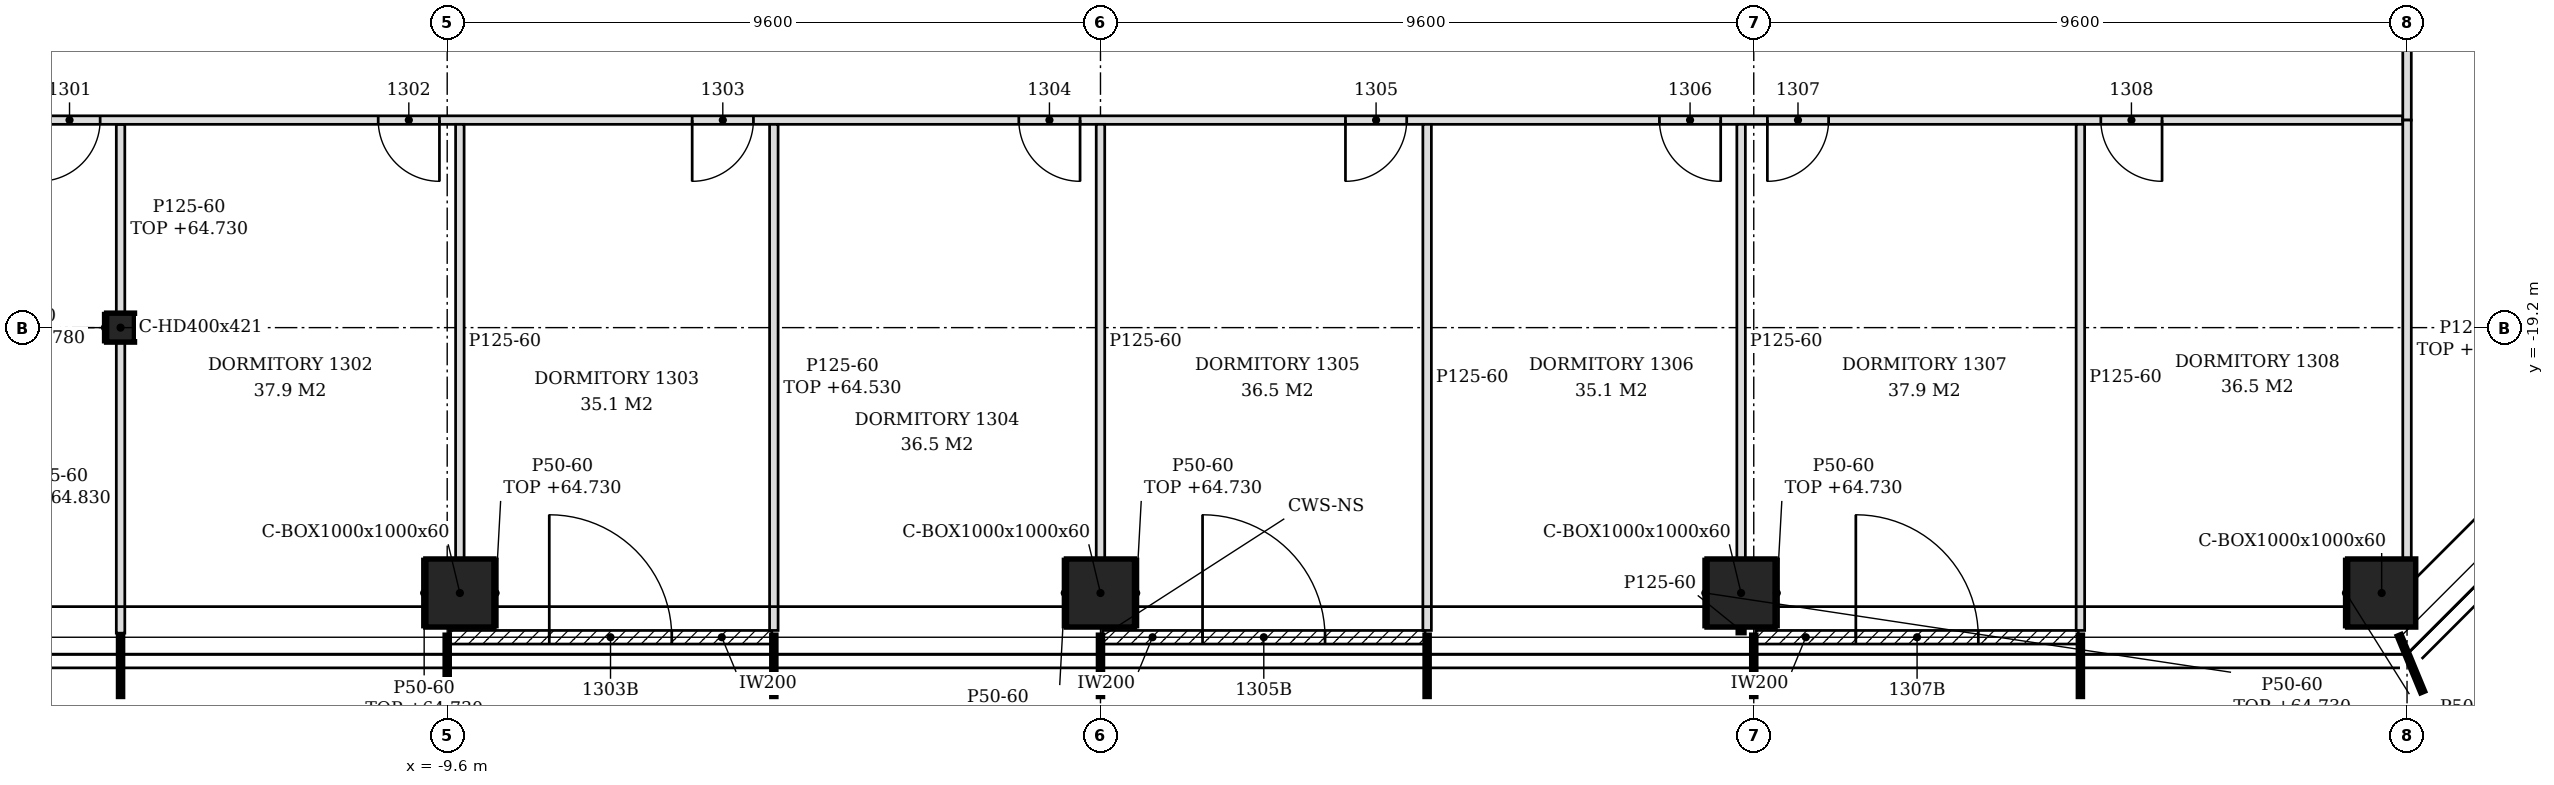
"""IFC4 building model, lengths in metres.
Left out: names, types, materials, properties, quantities, classifications, styles, units other than length and angle.
Written with IfcOpenShell. Run it as: python <this file> out.ifc"""

import sys

from ifc_helpers import new_model, si_unit, direction, frame, frame_2d, origin, origin_2d, place, context, subcontext, project, spatial, polyline, rectangle, hollow_rectangle, i_section, outline, extrude, element, fill, save


model = new_model("IFC4")
c1 = context("Model", 3, precision=1e-05, world=origin(), true_north=direction((0.0, 1.0)))
c2 = subcontext(c1, "Body", "Model", "MODEL_VIEW")
j1 = project(units=[si_unit("LENGTHUNIT", "METRE"), si_unit("PLANEANGLEUNIT", "RADIAN")], contexts=[c1])
p1 = place(None, origin())
s1 = spatial("IfcSite", under=j1, at=p1, CompositionType="ELEMENT")
p2 = place(p1, origin())
s2 = spatial("IfcBuilding", under=s1, at=p2, CompositionType="ELEMENT")
p3 = place(p2, frame((0.0, 0.0, 61.8)))
s3 = spatial("IfcBuildingStorey", under=s2, at=p3, CompositionType="ELEMENT", Elevation=61.8)
for number, where, z_axis, x_axis in (
    (1, (-9.414, -23.1, -0.15), (0.0, 0.0, 1.0), (1.0, 0.0, 0.0)),
    (2, (0.0, -23.1, -0.15), (0.0, 0.0, 1.0), (1.0, 0.0, 0.0)),
    (3, (9.414, -23.1, -0.15), (0.0, 0.0, 1.0), (1.0, 0.0, 0.0)),
    (4, (18.827, -23.1, -0.15), (0.0, 0.0, 1.0), (1.0, 0.0, 0.0)),
):
    element("IfcColumn", number, at=place(p3, frame(where, z_axis=z_axis, x_axis=x_axis)), inside=s3, PredefinedType="COLUMN", context=c2, shape_type="SweptSolid", body=[
        extrude(hollow_rectangle(XDim=1.0, YDim=1.0, WallThickness=0.06, at=origin_2d()), origin(), (0.0, 0.0, 1.0), 3.6),
    ])
p4 = place(p3, frame((-14.4, -19.2, -0.15), z_axis=(0.0, 0.0, 1.0), x_axis=(1.0, 0.0, 0.0)))
e5 = element("IfcColumn", 5, at=p4, inside=s3, PredefinedType="COLUMN", context=c2, shape_type="SweptSolid", body=[
    extrude(i_section(OverallWidth=0.409, OverallDepth=0.425, WebThickness=0.033, FlangeThickness=0.052, FilletRadius=0.015, at=origin_2d()), origin(), (0.0, 0.0, 1.0), 3.6),
])
p5 = place(p3, frame((-9.57, -23.75, 0.0), z_axis=(0.0, 0.0, 1.0), x_axis=(1.0, 0.0, 0.0)))
e6 = element("IfcWall", 6, at=p5, inside=s3, PredefinedType="NOTDEFINED", context=c2, shape_type="SweptSolid", body=[
    extrude(rectangle(XDim=4.74, YDim=0.2, at=frame_2d((2.37, 0.0))), origin(), (0.0, 0.0, 1.0), 3.45),
])
p6 = place(p5, frame((1.47, 0.0, 0.0)))
e7 = element("IfcOpeningElement", 7, at=p6, cuts=e6, PredefinedType="OPENING", context=c2, shape_type="SweptSolid", body=[
    extrude(rectangle(XDim=1.8, YDim=2.4, at=frame_2d((0.9, 1.2))), frame((0.0, 0.11, 0.0), z_axis=(0.0, -1.0, 0.0), x_axis=(1.0, 0.0, 0.0)), (0.0, 0.0, 1.0), 0.22),
])
p7 = place(p3, frame((0.03, -23.75, 0.0), z_axis=(0.0, 0.0, 1.0), x_axis=(1.0, 0.0, 0.0)))
e8 = element("IfcWall", 8, at=p7, inside=s3, PredefinedType="NOTDEFINED", context=c2, shape_type="SweptSolid", body=[
    extrude(rectangle(XDim=4.74, YDim=0.2, at=frame_2d((2.37, 0.0))), origin(), (0.0, 0.0, 1.0), 3.45),
])
p8 = place(p7, frame((1.47, 0.0, 0.0)))
e9 = element("IfcOpeningElement", 9, at=p8, cuts=e8, PredefinedType="OPENING", context=c2, shape_type="SweptSolid", body=[
    extrude(rectangle(XDim=1.8, YDim=2.4, at=frame_2d((0.9, 1.2))), frame((0.0, 0.11, 0.0), z_axis=(0.0, -1.0, 0.0), x_axis=(1.0, 0.0, 0.0)), (0.0, 0.0, 1.0), 0.22),
])
p9 = place(p3, frame((9.63, -23.75, 0.0), z_axis=(0.0, 0.0, 1.0), x_axis=(1.0, 0.0, 0.0)))
e10 = element("IfcWall", 10, at=p9, inside=s3, PredefinedType="NOTDEFINED", context=c2, shape_type="SweptSolid", body=[
    extrude(rectangle(XDim=4.74, YDim=0.2, at=frame_2d((2.37, 0.0))), origin(), (0.0, 0.0, 1.0), 3.45),
])
p10 = place(p9, frame((1.47, 0.0, 0.0)))
e11 = element("IfcOpeningElement", 11, at=p10, cuts=e10, PredefinedType="OPENING", context=c2, shape_type="SweptSolid", body=[
    extrude(rectangle(XDim=1.8, YDim=2.4, at=frame_2d((0.9, 1.2))), frame((0.0, 0.11, 0.0), z_axis=(0.0, -1.0, 0.0), x_axis=(1.0, 0.0, 0.0)), (0.0, 0.0, 1.0), 0.22),
])
p11 = place(p3, frame((-14.4, -23.69, 0.0), z_axis=(0.0, 0.0, 1.0), x_axis=(0.0, 1.0, 0.0)))
e12 = element("IfcWall", 12, at=p11, inside=s3, PredefinedType="PARTITIONING", context=c2, shape_type="SweptSolid", body=[
    extrude(outline(polyline([(0.0, 0.0), (4.277, 0.0), (4.278, 3.03), (0.74, 3.03), (0.738, 2.93), (0.44, 2.93), (0.438, 3.03), (0.0, 3.03), (0.0, 0.0)])), frame((0.0, 0.062, 0.0), z_axis=(0.0, -1.0, 0.0), x_axis=(1.0, 0.0, 0.0)), (0.0, 0.0, 1.0), 0.125),
])
p12 = place(p3, frame((-4.8, -23.65, 0.0), z_axis=(0.0, 0.0, 1.0), x_axis=(0.0, 1.0, 0.0)))
e13 = element("IfcWall", 13, at=p12, inside=s3, PredefinedType="PARTITIONING", context=c2, shape_type="SweptSolid", body=[
    extrude(rectangle(XDim=7.438, YDim=0.125, at=frame_2d((3.719, 0.0))), origin(), (0.0, 0.0, 1.0), 2.73),
])
p13 = place(p3, frame((4.8, -23.65, 0.0), z_axis=(0.0, 0.0, 1.0), x_axis=(0.0, 1.0, 0.0)))
e14 = element("IfcWall", 14, at=p13, inside=s3, PredefinedType="PARTITIONING", context=c2, shape_type="SweptSolid", body=[
    extrude(outline(polyline([(0.0, 0.0), (7.438, 0.0), (7.438, 3.45), (4.555, 3.45), (4.553, 2.88), (4.345, 2.88), (4.343, 3.45), (0.7, 3.45), (0.698, 2.93), (0.4, 2.93), (0.398, 3.45), (0.0, 3.45), (0.0, 0.0)])), frame((0.0, 0.062, 0.0), z_axis=(0.0, -1.0, 0.0), x_axis=(1.0, 0.0, 0.0)), (0.0, 0.0, 1.0), 0.125),
])
p14 = place(p3, frame((9.414, -23.703, 0.0), z_axis=(0.0, 0.0, 1.0), x_axis=(0.0, 1.0, 0.0)))
e15 = element("IfcWall", 15, at=p14, inside=s3, PredefinedType="PARTITIONING", context=c2, shape_type="SweptSolid", body=[
    extrude(rectangle(XDim=0.103, YDim=0.125, at=frame_2d((0.051, 0.0))), origin(), (0.0, 0.0, 1.0), 3.45),
])
p15 = place(p3, frame((14.4, -23.65, 0.0), z_axis=(0.0, 0.0, 1.0), x_axis=(0.0, 1.0, 0.0)))
e16 = element("IfcWall", 16, at=p15, inside=s3, PredefinedType="PARTITIONING", context=c2, shape_type="SweptSolid", body=[
    extrude(outline(polyline([(0.0, 0.0), (7.438, 0.0), (7.438, 3.45), (4.555, 3.45), (4.553, 2.88), (4.345, 2.88), (4.343, 3.45), (0.7, 3.45), (0.698, 2.93), (0.4, 2.93), (0.398, 3.45), (0.0, 3.45), (0.0, 0.0)])), frame((0.0, 0.062, 0.0), z_axis=(0.0, -1.0, 0.0), x_axis=(1.0, 0.0, 0.0)), (0.0, 0.0, 1.0), 0.125),
])
p16 = place(p3, frame((-9.414, -22.6, 0.0), z_axis=(0.0, 0.0, 1.0), x_axis=(0.0, 1.0, 0.0)))
e17 = element("IfcWall", 17, at=p16, inside=s3, PredefinedType="PARTITIONING", context=c2, shape_type="SweptSolid", body=[
    extrude(outline(polyline([(0.0, 0.0), (6.388, 0.0), (6.387, 3.45), (3.5, 3.45), (3.498, 2.93), (3.3, 2.93), (3.298, 3.45), (0.0, 3.45), (0.0, 0.0)])), frame((0.0, 0.062, 0.0), z_axis=(0.0, -1.0, 0.0), x_axis=(1.0, 0.0, 0.0)), (0.0, 0.0, 1.0), 0.125),
])
for number, where, z_axis, x_axis in (
    (18, (0.0, -22.6, 0.0), (0.0, 0.0, 1.0), (0.0, 1.0, 0.0)),
    (19, (9.414, -22.6, 0.0), (0.0, 0.0, 1.0), (0.0, 1.0, 0.0)),
):
    element("IfcWall", number, at=place(p3, frame(where, z_axis=z_axis, x_axis=x_axis)), inside=s3, PredefinedType="PARTITIONING", context=c2, shape_type="SweptSolid", body=[
        extrude(outline(polyline([(0.0, 0.0), (6.388, 0.0), (6.387, 3.45), (3.505, 3.45), (3.503, 2.88), (3.295, 2.88), (3.293, 3.45), (0.0, 3.45), (0.0, 0.0)])), frame((0.0, 0.062, 0.0), z_axis=(0.0, -1.0, 0.0), x_axis=(1.0, 0.0, 0.0)), (0.0, 0.0, 1.0), 0.125),
    ])
p17 = place(p3, frame((19.2, -22.6, 0.0), z_axis=(0.0, 0.0, 1.0), x_axis=(0.0, 1.0, 0.0)))
e20 = element("IfcWall", 20, at=p17, inside=s3, PredefinedType="PARTITIONING", context=c2, shape_type="SweptSolid", body=[
    extrude(outline(polyline([(0.0, 0.0), (6.45, 0.0), (6.45, 2.73), (0.43, 2.73), (0.428, 2.63), (0.0, 2.63), (0.0, 0.0)])), frame((0.0, 0.062, 0.0), z_axis=(0.0, -1.0, 0.0), x_axis=(1.0, 0.0, 0.0)), (0.0, 0.0, 1.0), 0.125),
])
p18 = place(p3, frame((-14.4, -18.988, 0.0), z_axis=(0.0, 0.0, 1.0), x_axis=(0.0, 1.0, 0.0)))
e21 = element("IfcWall", 21, at=p18, inside=s3, PredefinedType="PARTITIONING", context=c2, shape_type="SweptSolid", body=[
    extrude(rectangle(XDim=2.775, YDim=0.125, at=frame_2d((1.388, 0.0))), origin(), (0.0, 0.0, 1.0), 2.93),
])
p19 = place(p3, frame((-22.55, -16.15, 0.0), z_axis=(0.0, 0.0, 1.0), x_axis=(1.0, 0.0, 0.0)))
e22 = element("IfcWall", 22, at=p19, inside=s3, PredefinedType="PARTITIONING", context=c2, shape_type="SweptSolid", body=[
    extrude(outline(polyline([(0.0, 0.0), (41.688, 0.0), (41.688, 2.73), (41.6, 2.73), (41.598, 3.45), (29.9, 3.45), (29.898, 2.73), (29.6, 2.73), (29.598, 3.45), (17.9, 3.45), (17.898, 2.73), (17.6, 2.73), (17.598, 3.45), (8.3, 3.45), (8.298, 2.93), (8.0, 2.93), (7.998, 3.45), (0.0, 3.45), (0.0, 0.0)])), frame((0.0, 0.062, 0.0), z_axis=(0.0, -1.0, 0.0), x_axis=(1.0, 0.0, 0.0)), (0.0, 0.0, 1.0), 0.125),
])
p20 = place(p19, frame((6.95, 0.0, 0.0)))
e23 = element("IfcOpeningElement", 23, at=p20, cuts=e22, PredefinedType="OPENING", context=c2, shape_type="SweptSolid", body=[
    extrude(rectangle(XDim=0.9, YDim=2.1, at=frame_2d((0.45, 1.05))), frame((0.0, 0.073, 0.0), z_axis=(0.0, -1.0, 0.0), x_axis=(1.0, 0.0, 0.0)), (0.0, 0.0, 1.0), 0.145),
])
p21 = place(p19, frame((11.936, 0.0, 0.0)))
e24 = element("IfcOpeningElement", 24, at=p21, cuts=e22, PredefinedType="OPENING", context=c2, shape_type="SweptSolid", body=[
    extrude(rectangle(XDim=0.9, YDim=2.1, at=frame_2d((0.45, 1.05))), frame((0.0, 0.073, 0.0), z_axis=(0.0, -1.0, 0.0), x_axis=(1.0, 0.0, 0.0)), (0.0, 0.0, 1.0), 0.145),
])
p22 = place(p19, frame((16.55, 0.0, 0.0)))
e25 = element("IfcOpeningElement", 25, at=p22, cuts=e22, PredefinedType="OPENING", context=c2, shape_type="SweptSolid", body=[
    extrude(rectangle(XDim=0.9, YDim=2.1, at=frame_2d((0.45, 1.05))), frame((0.0, 0.073, 0.0), z_axis=(0.0, -1.0, 0.0), x_axis=(1.0, 0.0, 0.0)), (0.0, 0.0, 1.0), 0.145),
])
p23 = place(p19, frame((21.35, 0.0, 0.0)))
e26 = element("IfcOpeningElement", 26, at=p23, cuts=e22, PredefinedType="OPENING", context=c2, shape_type="SweptSolid", body=[
    extrude(rectangle(XDim=0.9, YDim=2.1, at=frame_2d((0.45, 1.05))), frame((0.0, 0.073, 0.0), z_axis=(0.0, -1.0, 0.0), x_axis=(1.0, 0.0, 0.0)), (0.0, 0.0, 1.0), 0.145),
])
p24 = place(p19, frame((26.15, 0.0, 0.0)))
e27 = element("IfcOpeningElement", 27, at=p24, cuts=e22, PredefinedType="OPENING", context=c2, shape_type="SweptSolid", body=[
    extrude(rectangle(XDim=0.9, YDim=2.1, at=frame_2d((0.45, 1.05))), frame((0.0, 0.073, 0.0), z_axis=(0.0, -1.0, 0.0), x_axis=(1.0, 0.0, 0.0)), (0.0, 0.0, 1.0), 0.145),
])
p25 = place(p19, frame((30.764, 0.0, 0.0)))
e28 = element("IfcOpeningElement", 28, at=p25, cuts=e22, PredefinedType="OPENING", context=c2, shape_type="SweptSolid", body=[
    extrude(rectangle(XDim=0.9, YDim=2.1, at=frame_2d((0.45, 1.05))), frame((0.0, 0.073, 0.0), z_axis=(0.0, -1.0, 0.0), x_axis=(1.0, 0.0, 0.0)), (0.0, 0.0, 1.0), 0.145),
])
p26 = place(p19, frame((32.35, 0.0, 0.0)))
e29 = element("IfcOpeningElement", 29, at=p26, cuts=e22, PredefinedType="OPENING", context=c2, shape_type="SweptSolid", body=[
    extrude(rectangle(XDim=0.9, YDim=2.1, at=frame_2d((0.45, 1.05))), frame((0.0, 0.073, 0.0), z_axis=(0.0, -1.0, 0.0), x_axis=(1.0, 0.0, 0.0)), (0.0, 0.0, 1.0), 0.145),
])
p27 = place(p19, frame((37.25, 0.0, 0.0)))
e30 = element("IfcOpeningElement", 30, at=p27, cuts=e22, PredefinedType="OPENING", context=c2, shape_type="SweptSolid", body=[
    extrude(rectangle(XDim=0.9, YDim=2.1, at=frame_2d((0.45, 1.05))), frame((0.0, 0.073, 0.0), z_axis=(0.0, -1.0, 0.0), x_axis=(1.0, 0.0, 0.0)), (0.0, 0.0, 1.0), 0.145),
])
p28 = place(p3, frame((19.2, -16.15, 0.0), z_axis=(0.0, 0.0, 1.0), x_axis=(0.0, 1.0, 0.0)))
e31 = element("IfcWall", 31, at=p28, inside=s3, PredefinedType="PARTITIONING", context=c2, shape_type="SweptSolid", body=[
    extrude(rectangle(XDim=7.513, YDim=0.125, at=frame_2d((3.756, 0.0))), origin(), (0.0, 0.0, 1.0), 2.73),
])
p29 = place(p28, frame((5.35, 0.0, 0.0)))
e32 = element("IfcOpeningElement", 32, at=p29, cuts=e31, PredefinedType="OPENING", context=c2, shape_type="SweptSolid", body=[
    extrude(rectangle(XDim=0.9, YDim=2.1, at=frame_2d((0.45, 1.05))), frame((0.0, 0.073, 0.0), z_axis=(0.0, -1.0, 0.0), x_axis=(1.0, 0.0, 0.0)), (0.0, 0.0, 1.0), 0.145),
])
p30 = place(p3, frame((-14.629, -19.413, 0.0), z_axis=(0.0, 0.0, 1.0), x_axis=(0.0, 1.0, 0.0)))
e33 = element("IfcWall", 33, at=p30, inside=s3, PredefinedType="PARTITIONING", context=c2, shape_type="SweptSolid", body=[
    extrude(rectangle(XDim=0.425, YDim=0.05, at=frame_2d((0.212, 0.0))), origin(), (0.0, 0.0, 1.0), 2.98),
])
for number, where, z_axis, x_axis in (
    (34, (-0.525, -23.6, 0.0), (0.0, 0.0, 1.0), (0.0, 1.0, 0.0)),
    (35, (0.525, -23.6, 0.0), (0.0, 0.0, 1.0), (0.0, 1.0, 0.0)),
    (36, (8.889, -23.6, 0.0), (0.0, 0.0, 1.0), (0.0, 1.0, 0.0)),
    (37, (9.939, -23.6, 0.0), (0.0, 0.0, 1.0), (0.0, 1.0, 0.0)),
    (38, (-9.939, -23.6, 0.0), (0.0, 0.0, 1.0), (0.0, 1.0, 0.0)),
    (39, (-8.889, -23.6, 0.0), (0.0, 0.0, 1.0), (0.0, 1.0, 0.0)),
    (40, (18.302, -23.6, 0.0), (0.0, 0.0, 1.0), (0.0, 1.0, 0.0)),
):
    element("IfcWall", number, at=place(p3, frame(where, z_axis=z_axis, x_axis=x_axis)), inside=s3, PredefinedType="PARTITIONING", context=c2, shape_type="SweptSolid", body=[
        extrude(rectangle(XDim=1.0, YDim=0.05, at=frame_2d((0.5, 0.0))), origin(), (0.0, 0.0, 1.0), 2.93),
    ])
p31 = place(p6, origin())
e41 = element("IfcDoor", 41, at=p31, inside=s3, OperationType="SINGLE_SWING_LEFT", PredefinedType="DOOR", context=c2, shape_type="SweptSolid", body=[
    extrude(rectangle(XDim=1.8, YDim=2.4, at=frame_2d((0.9, 1.2))), frame((0.0, 0.025, 0.0), z_axis=(0.0, -1.0, 0.0), x_axis=(1.0, 0.0, 0.0)), (0.0, 0.0, 1.0), 0.05),
])
fill(e7, e41)
p32 = place(p8, origin())
e42 = element("IfcDoor", 42, at=p32, inside=s3, OperationType="SINGLE_SWING_LEFT", PredefinedType="DOOR", context=c2, shape_type="SweptSolid", body=[
    extrude(rectangle(XDim=1.8, YDim=2.4, at=frame_2d((0.9, 1.2))), frame((0.0, 0.025, 0.0), z_axis=(0.0, -1.0, 0.0), x_axis=(1.0, 0.0, 0.0)), (0.0, 0.0, 1.0), 0.05),
])
fill(e9, e42)
p33 = place(p10, origin())
e43 = element("IfcDoor", 43, at=p33, inside=s3, OperationType="SINGLE_SWING_LEFT", PredefinedType="DOOR", context=c2, shape_type="SweptSolid", body=[
    extrude(rectangle(XDim=1.8, YDim=2.4, at=frame_2d((0.9, 1.2))), frame((0.0, 0.025, 0.0), z_axis=(0.0, -1.0, 0.0), x_axis=(1.0, 0.0, 0.0)), (0.0, 0.0, 1.0), 0.05),
])
fill(e11, e43)
p34 = place(p20, frame((0.9, 0.0, 0.0), z_axis=(0.0, 0.0, 1.0), x_axis=(-1.0, 0.0, 0.0)))
e44 = element("IfcDoor", 44, at=p34, inside=s3, OperationType="SINGLE_SWING_RIGHT", PredefinedType="DOOR", context=c2, shape_type="SweptSolid", body=[
    extrude(rectangle(XDim=0.9, YDim=2.1, at=frame_2d((0.45, 1.05))), frame((0.0, 0.025, 0.0), z_axis=(0.0, -1.0, 0.0), x_axis=(1.0, 0.0, 0.0)), (0.0, 0.0, 1.0), 0.05),
])
fill(e23, e44)
p35 = place(p21, frame((0.9, 0.0, 0.0), z_axis=(0.0, 0.0, 1.0), x_axis=(-1.0, 0.0, 0.0)))
e45 = element("IfcDoor", 45, at=p35, inside=s3, OperationType="SINGLE_SWING_LEFT", PredefinedType="DOOR", context=c2, shape_type="SweptSolid", body=[
    extrude(rectangle(XDim=0.9, YDim=2.1, at=frame_2d((0.45, 1.05))), frame((0.0, 0.025, 0.0), z_axis=(0.0, -1.0, 0.0), x_axis=(1.0, 0.0, 0.0)), (0.0, 0.0, 1.0), 0.05),
])
fill(e24, e45)
p36 = place(p22, frame((0.9, 0.0, 0.0), z_axis=(0.0, 0.0, 1.0), x_axis=(-1.0, 0.0, 0.0)))
e46 = element("IfcDoor", 46, at=p36, inside=s3, OperationType="SINGLE_SWING_RIGHT", PredefinedType="DOOR", context=c2, shape_type="SweptSolid", body=[
    extrude(rectangle(XDim=0.9, YDim=2.1, at=frame_2d((0.45, 1.05))), frame((0.0, 0.025, 0.0), z_axis=(0.0, -1.0, 0.0), x_axis=(1.0, 0.0, 0.0)), (0.0, 0.0, 1.0), 0.05),
])
fill(e25, e46)
p37 = place(p23, frame((0.9, 0.0, 0.0), z_axis=(0.0, 0.0, 1.0), x_axis=(-1.0, 0.0, 0.0)))
e47 = element("IfcDoor", 47, at=p37, inside=s3, OperationType="SINGLE_SWING_LEFT", PredefinedType="DOOR", context=c2, shape_type="SweptSolid", body=[
    extrude(rectangle(XDim=0.9, YDim=2.1, at=frame_2d((0.45, 1.05))), frame((0.0, 0.025, 0.0), z_axis=(0.0, -1.0, 0.0), x_axis=(1.0, 0.0, 0.0)), (0.0, 0.0, 1.0), 0.05),
])
fill(e26, e47)
p38 = place(p24, frame((0.9, 0.0, 0.0), z_axis=(0.0, 0.0, 1.0), x_axis=(-1.0, 0.0, 0.0)))
e48 = element("IfcDoor", 48, at=p38, inside=s3, OperationType="SINGLE_SWING_RIGHT", PredefinedType="DOOR", context=c2, shape_type="SweptSolid", body=[
    extrude(rectangle(XDim=0.9, YDim=2.1, at=frame_2d((0.45, 1.05))), frame((0.0, 0.025, 0.0), z_axis=(0.0, -1.0, 0.0), x_axis=(1.0, 0.0, 0.0)), (0.0, 0.0, 1.0), 0.05),
])
fill(e27, e48)
p39 = place(p25, frame((0.9, 0.0, 0.0), z_axis=(0.0, 0.0, 1.0), x_axis=(-1.0, 0.0, 0.0)))
e49 = element("IfcDoor", 49, at=p39, inside=s3, OperationType="SINGLE_SWING_LEFT", PredefinedType="DOOR", context=c2, shape_type="SweptSolid", body=[
    extrude(rectangle(XDim=0.9, YDim=2.1, at=frame_2d((0.45, 1.05))), frame((0.0, 0.025, 0.0), z_axis=(0.0, -1.0, 0.0), x_axis=(1.0, 0.0, 0.0)), (0.0, 0.0, 1.0), 0.05),
])
fill(e28, e49)
p40 = place(p26, frame((0.9, 0.0, 0.0), z_axis=(0.0, 0.0, 1.0), x_axis=(-1.0, 0.0, 0.0)))
e50 = element("IfcDoor", 50, at=p40, inside=s3, OperationType="SINGLE_SWING_RIGHT", PredefinedType="DOOR", context=c2, shape_type="SweptSolid", body=[
    extrude(rectangle(XDim=0.9, YDim=2.1, at=frame_2d((0.45, 1.05))), frame((0.0, 0.025, 0.0), z_axis=(0.0, -1.0, 0.0), x_axis=(1.0, 0.0, 0.0)), (0.0, 0.0, 1.0), 0.05),
])
fill(e29, e50)
p41 = place(p27, frame((0.9, 0.0, 0.0), z_axis=(0.0, 0.0, 1.0), x_axis=(-1.0, 0.0, 0.0)))
e51 = element("IfcDoor", 51, at=p41, inside=s3, OperationType="SINGLE_SWING_LEFT", PredefinedType="DOOR", context=c2, shape_type="SweptSolid", body=[
    extrude(rectangle(XDim=0.9, YDim=2.1, at=frame_2d((0.45, 1.05))), frame((0.0, 0.025, 0.0), z_axis=(0.0, -1.0, 0.0), x_axis=(1.0, 0.0, 0.0)), (0.0, 0.0, 1.0), 0.05),
])
fill(e30, e51)
save(model, sys.argv[1])
